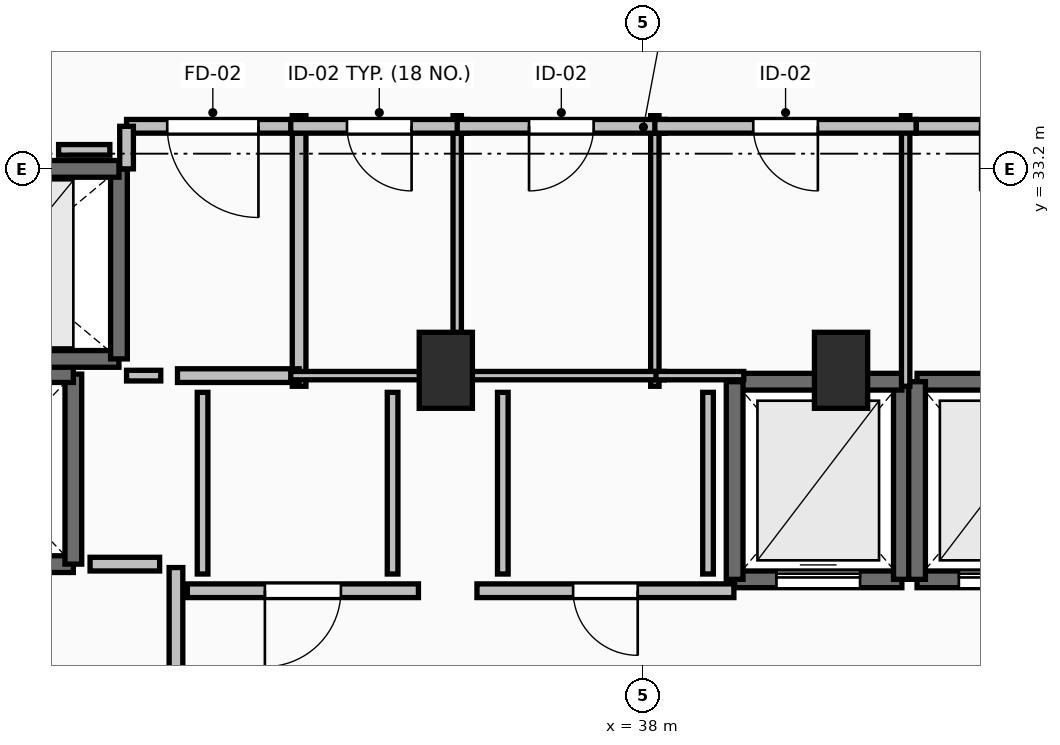
"""IFC4 building model, lengths in metres.
Left out: names, types, materials, properties, quantities, classifications, styles, units other than length and angle.
Written with IfcOpenShell. Run it as: python <this file> out.ifc"""

import sys

from ifc_helpers import new_model, si_unit, direction, frame, frame_2d, origin, origin_2d, place, context, subcontext, project, spatial, rectangle, extrude, element, fill, save


model = new_model("IFC4")
c1 = context("Model", 3, precision=1e-05, world=origin(), true_north=direction((0.0, 1.0)))
c2 = subcontext(c1, "Body", "Model", "MODEL_VIEW")
j1 = project(units=[si_unit("LENGTHUNIT", "METRE"), si_unit("PLANEANGLEUNIT", "RADIAN")], contexts=[c1])
p1 = place(None, origin())
s1 = spatial("IfcSite", under=j1, at=p1, CompositionType="ELEMENT")
p2 = place(p1, origin())
s2 = spatial("IfcBuilding", under=s1, at=p2, CompositionType="ELEMENT")
p3 = place(p2, frame((0.0, 0.0, 273.3)))
s3 = spatial("IfcBuildingStorey", under=s2, at=p3, CompositionType="ELEMENT", Elevation=273.3)
for number, where, z_axis, x_axis in (
    (1, (35.4, 30.55, 0.0), (0.0, 0.0, 1.0), (1.0, 0.0, 0.0)),
    (2, (40.6, 30.55, 0.0), (0.0, 0.0, 1.0), (1.0, 0.0, 0.0)),
):
    element("IfcColumn", number, at=place(p3, frame(where, z_axis=z_axis, x_axis=x_axis)), inside=s3, PredefinedType="PILASTER", context=c2, shape_type="SweptSolid", body=[
        extrude(rectangle(XDim=0.7, YDim=1.0, at=origin_2d()), origin(), (0.0, 0.0, 1.0), 3.55),
    ])
p4 = place(p3, frame((39.2, 27.8, 0.0), z_axis=(0.0, 0.0, 1.0), x_axis=(1.0, 0.0, 0.0)))
e3 = element("IfcWall", 3, at=p4, inside=s3, PredefinedType="SOLIDWALL", context=c2, shape_type="SweptSolid", body=[
    extrude(rectangle(XDim=2.2, YDim=0.22, at=frame_2d((1.1, 0.0))), origin(), (0.0, 0.0, 1.0), 3.29),
])
p5 = place(p4, frame((0.55, 0.0, 0.0)))
e4 = element("IfcOpeningElement", 4, at=p5, cuts=e3, PredefinedType="OPENING", context=c2, shape_type="SweptSolid", body=[
    extrude(rectangle(XDim=1.1, YDim=2.2, at=frame_2d((0.55, 1.1))), frame((0.0, 0.125, 0.0), z_axis=(0.0, -1.0, 0.0), x_axis=(1.0, 0.0, 0.0)), (0.0, 0.0, 1.0), 0.25),
])
p6 = place(p3, frame((41.4, 27.8, 0.0), z_axis=(0.0, 0.0, 1.0), x_axis=(0.0, 1.0, 0.0)))
e5 = element("IfcWall", 5, at=p6, inside=s3, PredefinedType="SOLIDWALL", context=c2, shape_type="SweptSolid", body=[
    extrude(rectangle(XDim=2.6, YDim=0.22, at=frame_2d((1.3, 0.0))), origin(), (0.0, 0.0, 1.0), 3.29),
])
p7 = place(p3, frame((41.4, 30.4, 0.0), z_axis=(0.0, 0.0, 1.0), x_axis=(-1.0, 0.0, 0.0)))
e6 = element("IfcWall", 6, at=p7, inside=s3, PredefinedType="SOLIDWALL", context=c2, shape_type="SweptSolid", body=[
    extrude(rectangle(XDim=2.2, YDim=0.22, at=frame_2d((1.1, 0.0))), origin(), (0.0, 0.0, 1.0), 3.29),
])
p8 = place(p3, frame((39.2, 30.4, 0.0), z_axis=(0.0, 0.0, 1.0), x_axis=(0.0, -1.0, 0.0)))
e7 = element("IfcWall", 7, at=p8, inside=s3, PredefinedType="SOLIDWALL", context=c2, shape_type="SweptSolid", body=[
    extrude(rectangle(XDim=2.6, YDim=0.22, at=frame_2d((1.3, 0.0))), origin(), (0.0, 0.0, 1.0), 3.29),
])
p9 = place(p3, frame((41.6, 27.8, 0.0), z_axis=(0.0, 0.0, 1.0), x_axis=(1.0, 0.0, 0.0)))
e8 = element("IfcWall", 8, at=p9, inside=s3, PredefinedType="SOLIDWALL", context=c2, shape_type="SweptSolid", body=[
    extrude(rectangle(XDim=2.2, YDim=0.22, at=frame_2d((1.1, 0.0))), origin(), (0.0, 0.0, 1.0), 3.29),
])
p10 = place(p9, frame((0.55, 0.0, 0.0)))
e9 = element("IfcOpeningElement", 9, at=p10, cuts=e8, PredefinedType="OPENING", context=c2, shape_type="SweptSolid", body=[
    extrude(rectangle(XDim=1.1, YDim=2.2, at=frame_2d((0.55, 1.1))), frame((0.0, 0.125, 0.0), z_axis=(0.0, -1.0, 0.0), x_axis=(1.0, 0.0, 0.0)), (0.0, 0.0, 1.0), 0.25),
])
p11 = place(p3, frame((43.8, 30.4, 0.0), z_axis=(0.0, 0.0, 1.0), x_axis=(-1.0, 0.0, 0.0)))
e10 = element("IfcWall", 10, at=p11, inside=s3, PredefinedType="SOLIDWALL", context=c2, shape_type="SweptSolid", body=[
    extrude(rectangle(XDim=2.2, YDim=0.22, at=frame_2d((1.1, 0.0))), origin(), (0.0, 0.0, 1.0), 3.29),
])
p12 = place(p3, frame((41.6, 30.4, 0.0), z_axis=(0.0, 0.0, 1.0), x_axis=(0.0, -1.0, 0.0)))
e11 = element("IfcWall", 11, at=p12, inside=s3, PredefinedType="SOLIDWALL", context=c2, shape_type="SweptSolid", body=[
    extrude(rectangle(XDim=2.6, YDim=0.22, at=frame_2d((1.3, 0.0))), origin(), (0.0, 0.0, 1.0), 3.29),
])
p13 = place(p3, frame((28.1, 28.0, 0.0), z_axis=(0.0, 0.0, 1.0), x_axis=(1.0, 0.0, 0.0)))
e12 = element("IfcWall", 12, at=p13, inside=s3, PredefinedType="SHEAR", context=c2, shape_type="SweptSolid", body=[
    extrude(rectangle(XDim=2.4, YDim=0.22, at=frame_2d((1.2, 0.0))), origin(), (0.0, 0.0, 1.0), 3.29),
])
p14 = place(p13, frame((0.6, 0.0, 0.0)))
e13 = element("IfcOpeningElement", 13, at=p14, cuts=e12, PredefinedType="OPENING", context=c2, shape_type="SweptSolid", body=[
    extrude(rectangle(XDim=1.2, YDim=2.2, at=frame_2d((0.6, 1.1))), frame((0.0, 0.125, 0.0), z_axis=(0.0, -1.0, 0.0), x_axis=(1.0, 0.0, 0.0)), (0.0, 0.0, 1.0), 0.25),
])
p15 = place(p3, frame((30.5, 28.0, 0.0), z_axis=(0.0, 0.0, 1.0), x_axis=(0.0, 1.0, 0.0)))
e14 = element("IfcWall", 14, at=p15, inside=s3, PredefinedType="SHEAR", context=c2, shape_type="SweptSolid", body=[
    extrude(rectangle(XDim=2.5, YDim=0.22, at=frame_2d((1.25, 0.0))), origin(), (0.0, 0.0, 1.0), 3.29),
])
p16 = place(p3, frame((30.5, 30.5, 0.0), z_axis=(0.0, 0.0, 1.0), x_axis=(-1.0, 0.0, 0.0)))
e15 = element("IfcWall", 15, at=p16, inside=s3, PredefinedType="SHEAR", context=c2, shape_type="SweptSolid", body=[
    extrude(rectangle(XDim=2.4, YDim=0.22, at=frame_2d((1.2, 0.0))), origin(), (0.0, 0.0, 1.0), 3.29),
])
p17 = place(p3, frame((28.1, 30.7, 0.0), z_axis=(0.0, 0.0, 1.0), x_axis=(1.0, 0.0, 0.0)))
e16 = element("IfcWall", 16, at=p17, inside=s3, PredefinedType="SOLIDWALL", context=c2, shape_type="SweptSolid", body=[
    extrude(rectangle(XDim=3.0, YDim=0.22, at=frame_2d((1.5, 0.0))), origin(), (0.0, 0.0, 1.0), 3.29),
])
p18 = place(p3, frame((31.1, 30.7, 0.0), z_axis=(0.0, 0.0, 1.0), x_axis=(0.0, 1.0, 0.0)))
e17 = element("IfcWall", 17, at=p18, inside=s3, PredefinedType="SOLIDWALL", context=c2, shape_type="SweptSolid", body=[
    extrude(rectangle(XDim=2.5, YDim=0.22, at=frame_2d((1.25, 0.0))), origin(), (0.0, 0.0, 1.0), 3.29),
])
p19 = place(p3, frame((31.1, 33.2, 0.0), z_axis=(0.0, 0.0, 1.0), x_axis=(-1.0, 0.0, 0.0)))
e18 = element("IfcWall", 18, at=p19, inside=s3, PredefinedType="SOLIDWALL", context=c2, shape_type="SweptSolid", body=[
    extrude(rectangle(XDim=3.0, YDim=0.22, at=frame_2d((1.5, 0.0))), origin(), (0.0, 0.0, 1.0), 3.29),
])
p20 = place(p19, frame((0.9, 0.0, 0.0)))
e19 = element("IfcOpeningElement", 19, at=p20, cuts=e18, PredefinedType="OPENING", context=c2, shape_type="SweptSolid", body=[
    extrude(rectangle(XDim=1.2, YDim=2.2, at=frame_2d((0.6, 1.1))), frame((0.0, 0.125, 0.0), z_axis=(0.0, -1.0, 0.0), x_axis=(1.0, 0.0, 0.0)), (0.0, 0.0, 1.0), 0.25),
])
p21 = place(p3, frame((31.85, 24.045, 0.0), z_axis=(0.0, 0.0, 1.0), x_axis=(0.0, 1.0, 0.0)))
e20 = element("IfcWall", 20, at=p21, inside=s3, PredefinedType="PARTITIONING", context=c2, shape_type="SweptSolid", body=[
    extrude(rectangle(XDim=3.91, YDim=0.18, at=frame_2d((1.955, 0.0))), origin(), (0.0, 0.0, 1.0), 3.29),
])
p22 = place(p21, frame((1.355, 0.0, 0.0)))
e21 = element("IfcOpeningElement", 21, at=p22, cuts=e20, PredefinedType="OPENING", context=c2, shape_type="SweptSolid", body=[
    extrude(rectangle(XDim=1.2, YDim=2.15, at=frame_2d((0.6, 1.075))), frame((0.0, 0.105, 0.0), z_axis=(0.0, -1.0, 0.0), x_axis=(1.0, 0.0, 0.0)), (0.0, 0.0, 1.0), 0.21),
])
p23 = place(p3, frame((33.47, 30.34, 0.0), z_axis=(0.0, 0.0, 1.0), x_axis=(0.0, 1.0, 0.0)))
e22 = element("IfcWall", 22, at=p23, inside=s3, PredefinedType="PARTITIONING", context=c2, shape_type="SweptSolid", body=[
    extrude(rectangle(XDim=3.56, YDim=0.18, at=frame_2d((1.78, 0.0))), origin(), (0.0, 0.0, 1.0), 3.29),
])
p24 = place(p3, frame((31.87, 30.48, 0.0), z_axis=(0.0, 0.0, 1.0), x_axis=(1.0, 0.0, 0.0)))
e23 = element("IfcWall", 23, at=p24, inside=s3, PredefinedType="PARTITIONING", context=c2, shape_type="SweptSolid", body=[
    extrude(rectangle(XDim=1.6, YDim=0.18, at=frame_2d((0.8, 0.0))), origin(), (0.0, 0.0, 1.0), 3.29),
])
p25 = place(p3, frame((33.47, 33.76, 0.0), z_axis=(0.0, 0.0, 1.0), x_axis=(-1.0, 0.0, 0.0)))
e24 = element("IfcWall", 24, at=p25, inside=s3, PredefinedType="PARTITIONING", context=c2, shape_type="SweptSolid", body=[
    extrude(rectangle(XDim=2.27, YDim=0.18, at=frame_2d((1.135, 0.0))), origin(), (0.0, 0.0, 1.0), 3.29),
])
p26 = place(p25, frame((0.535, 0.0, 0.0)))
e25 = element("IfcOpeningElement", 25, at=p26, cuts=e24, PredefinedType="OPENING", context=c2, shape_type="SweptSolid", body=[
    extrude(rectangle(XDim=1.2, YDim=2.15, at=frame_2d((0.6, 1.075))), frame((0.0, 0.105, 0.0), z_axis=(0.0, -1.0, 0.0), x_axis=(1.0, 0.0, 0.0)), (0.0, 0.0, 1.0), 0.21),
])
p27 = place(p3, frame((31.2, 33.76, 0.0), z_axis=(0.0, 0.0, 1.0), x_axis=(0.0, -1.0, 0.0)))
e26 = element("IfcWall", 26, at=p27, inside=s3, PredefinedType="PARTITIONING", context=c2, shape_type="SweptSolid", body=[
    extrude(rectangle(XDim=0.56, YDim=0.18, at=frame_2d((0.28, 0.0))), origin(), (0.0, 0.0, 1.0), 3.29),
])
p28 = place(p3, frame((35.04, 27.65, 0.0), z_axis=(0.0, 0.0, 1.0), x_axis=(-1.0, 0.0, 0.0)))
e27 = element("IfcWall", 27, at=p28, inside=s3, PredefinedType="PARTITIONING", context=c2, shape_type="SweptSolid", body=[
    extrude(rectangle(XDim=3.04, YDim=0.18, at=frame_2d((1.52, 0.0))), origin(), (0.0, 0.0, 1.0), 3.29),
])
p29 = place(p28, frame((1.02, 0.0, 0.0)))
e28 = element("IfcOpeningElement", 28, at=p29, cuts=e27, PredefinedType="OPENING", context=c2, shape_type="SweptSolid", body=[
    extrude(rectangle(XDim=1.0, YDim=2.15, at=frame_2d((0.5, 1.075))), frame((0.0, 0.105, 0.0), z_axis=(0.0, -1.0, 0.0), x_axis=(1.0, 0.0, 0.0)), (0.0, 0.0, 1.0), 0.21),
])
p30 = place(p3, frame((39.19, 27.65, 0.0), z_axis=(0.0, 0.0, 1.0), x_axis=(-1.0, 0.0, 0.0)))
e29 = element("IfcWall", 29, at=p30, inside=s3, PredefinedType="PARTITIONING", context=c2, shape_type="SweptSolid", body=[
    extrude(rectangle(XDim=3.38, YDim=0.18, at=frame_2d((1.69, 0.0))), origin(), (0.0, 0.0, 1.0), 3.29),
])
p31 = place(p30, frame((1.265, 0.0, 0.0)))
e30 = element("IfcOpeningElement", 30, at=p31, cuts=e29, PredefinedType="OPENING", context=c2, shape_type="SweptSolid", body=[
    extrude(rectangle(XDim=0.85, YDim=2.1, at=frame_2d((0.425, 1.05))), frame((0.0, 0.105, 0.0), z_axis=(0.0, -1.0, 0.0), x_axis=(1.0, 0.0, 0.0)), (0.0, 0.0, 1.0), 0.21),
])
p32 = place(p3, frame((35.55, 30.34, 0.0), z_axis=(0.0, 0.0, 1.0), x_axis=(0.0, 1.0, 0.0)))
e31 = element("IfcWall", 31, at=p32, inside=s3, PredefinedType="PARTITIONING", context=c2, shape_type="SweptSolid", body=[
    extrude(rectangle(XDim=3.56, YDim=0.11, at=frame_2d((1.78, 0.0))), origin(), (0.0, 0.0, 1.0), 2.482),
])
p33 = place(p3, frame((33.36, 30.48, 0.0), z_axis=(0.0, 0.0, 1.0), x_axis=(1.0, 0.0, 0.0)))
e32 = element("IfcWall", 32, at=p33, inside=s3, PredefinedType="PARTITIONING", context=c2, shape_type="SweptSolid", body=[
    extrude(rectangle(XDim=1.81, YDim=0.11, at=frame_2d((0.905, 0.0))), origin(), (0.0, 0.0, 1.0), 3.29),
])
p34 = place(p3, frame((35.69, 33.76, 0.0), z_axis=(0.0, 0.0, 1.0), x_axis=(-1.0, 0.0, 0.0)))
e33 = element("IfcWall", 33, at=p34, inside=s3, PredefinedType="PARTITIONING", context=c2, shape_type="SweptSolid", body=[
    extrude(rectangle(XDim=2.33, YDim=0.18, at=frame_2d((1.165, 0.0))), origin(), (0.0, 0.0, 1.0), 3.29),
])
p35 = place(p34, frame((0.74, 0.0, 0.0)))
e34 = element("IfcOpeningElement", 34, at=p35, cuts=e33, PredefinedType="OPENING", context=c2, shape_type="SweptSolid", body=[
    extrude(rectangle(XDim=0.85, YDim=2.1, at=frame_2d((0.425, 1.05))), frame((0.0, 0.105, 0.0), z_axis=(0.0, -1.0, 0.0), x_axis=(1.0, 0.0, 0.0)), (0.0, 0.0, 1.0), 0.21),
])
p36 = place(p3, frame((38.15, 30.34, 0.0), z_axis=(0.0, 0.0, 1.0), x_axis=(0.0, 1.0, 0.0)))
e35 = element("IfcWall", 35, at=p36, inside=s3, PredefinedType="PARTITIONING", context=c2, shape_type="SweptSolid", body=[
    extrude(rectangle(XDim=3.56, YDim=0.11, at=frame_2d((1.78, 0.0))), origin(), (0.0, 0.0, 1.0), 2.482),
])
p37 = place(p3, frame((35.68, 30.48, 0.0), z_axis=(0.0, 0.0, 1.0), x_axis=(1.0, 0.0, 0.0)))
e36 = element("IfcWall", 36, at=p37, inside=s3, PredefinedType="PARTITIONING", context=c2, shape_type="SweptSolid", body=[
    extrude(rectangle(XDim=2.595, YDim=0.11, at=frame_2d((1.297, 0.0))), origin(), (0.0, 0.0, 1.0), 2.482),
])
p38 = place(p3, frame((38.29, 33.76, 0.0), z_axis=(0.0, 0.0, 1.0), x_axis=(-1.0, 0.0, 0.0)))
e37 = element("IfcWall", 37, at=p38, inside=s3, PredefinedType="PARTITIONING", context=c2, shape_type="SweptSolid", body=[
    extrude(rectangle(XDim=2.74, YDim=0.18, at=frame_2d((1.37, 0.0))), origin(), (0.0, 0.0, 1.0), 3.29),
])
p39 = place(p38, frame((0.945, 0.0, 0.0)))
e38 = element("IfcOpeningElement", 38, at=p39, cuts=e37, PredefinedType="OPENING", context=c2, shape_type="SweptSolid", body=[
    extrude(rectangle(XDim=0.85, YDim=2.1, at=frame_2d((0.425, 1.05))), frame((0.0, 0.105, 0.0), z_axis=(0.0, -1.0, 0.0), x_axis=(1.0, 0.0, 0.0)), (0.0, 0.0, 1.0), 0.21),
])
p40 = place(p3, frame((41.45, 30.34, 0.0), z_axis=(0.0, 0.0, 1.0), x_axis=(0.0, 1.0, 0.0)))
e39 = element("IfcWall", 39, at=p40, inside=s3, PredefinedType="PARTITIONING", context=c2, shape_type="SweptSolid", body=[
    extrude(rectangle(XDim=3.56, YDim=0.11, at=frame_2d((1.78, 0.0))), origin(), (0.0, 0.0, 1.0), 3.29),
])
p41 = place(p3, frame((38.165, 30.48, 0.0), z_axis=(0.0, 0.0, 1.0), x_axis=(1.0, 0.0, 0.0)))
e40 = element("IfcWall", 40, at=p41, inside=s3, PredefinedType="PARTITIONING", context=c2, shape_type="SweptSolid", body=[
    extrude(rectangle(XDim=1.155, YDim=0.11, at=frame_2d((0.578, 0.0))), origin(), (0.0, 0.0, 1.0), 2.482),
])
p42 = place(p3, frame((41.59, 33.76, 0.0), z_axis=(0.0, 0.0, 1.0), x_axis=(-1.0, 0.0, 0.0)))
e41 = element("IfcWall", 41, at=p42, inside=s3, PredefinedType="PARTITIONING", context=c2, shape_type="SweptSolid", body=[
    extrude(rectangle(XDim=3.44, YDim=0.18, at=frame_2d((1.72, 0.0))), origin(), (0.0, 0.0, 1.0), 3.29),
])
p43 = place(p42, frame((1.295, 0.0, 0.0)))
e42 = element("IfcOpeningElement", 42, at=p43, cuts=e41, PredefinedType="OPENING", context=c2, shape_type="SweptSolid", body=[
    extrude(rectangle(XDim=0.85, YDim=2.1, at=frame_2d((0.425, 1.05))), frame((0.0, 0.105, 0.0), z_axis=(0.0, -1.0, 0.0), x_axis=(1.0, 0.0, 0.0)), (0.0, 0.0, 1.0), 0.21),
])
p44 = place(p3, frame((44.12, 33.76, 0.0), z_axis=(0.0, 0.0, 1.0), x_axis=(-1.0, 0.0, 0.0)))
e43 = element("IfcWall", 43, at=p44, inside=s3, PredefinedType="PARTITIONING", context=c2, shape_type="SweptSolid", body=[
    extrude(rectangle(XDim=2.53, YDim=0.18, at=frame_2d((1.265, 0.0))), origin(), (0.0, 0.0, 1.0), 3.29),
])
p45 = place(p44, frame((0.84, 0.0, 0.0)))
e44 = element("IfcOpeningElement", 44, at=p45, cuts=e43, PredefinedType="OPENING", context=c2, shape_type="SweptSolid", body=[
    extrude(rectangle(XDim=0.85, YDim=2.1, at=frame_2d((0.425, 1.05))), frame((0.0, 0.105, 0.0), z_axis=(0.0, -1.0, 0.0), x_axis=(1.0, 0.0, 0.0)), (0.0, 0.0, 1.0), 0.21),
])
p46 = place(p3, frame((31.635, 28.0, 0.0), z_axis=(0.0, 0.0, 1.0), x_axis=(-1.0, 0.0, 0.0)))
e45 = element("IfcWall", 45, at=p46, inside=s3, PredefinedType="PARTITIONING", context=c2, shape_type="SweptSolid", body=[
    extrude(rectangle(XDim=0.915, YDim=0.18, at=frame_2d((0.458, 0.0))), origin(), (0.0, 0.0, 1.0), 3.29),
])
p47 = place(p3, frame((31.2, 30.48, 0.0), z_axis=(0.0, 0.0, 1.0), x_axis=(1.0, 0.0, 0.0)))
e46 = element("IfcWall", 46, at=p47, inside=s3, PredefinedType="PARTITIONING", context=c2, shape_type="SweptSolid", body=[
    extrude(rectangle(XDim=0.45, YDim=0.14, at=frame_2d((0.225, 0.0))), origin(), (0.0, 0.0, 1.0), 3.29),
])
for number, where, z_axis, x_axis in (
    (47, (32.2, 30.26, 0.0), (0.0, 0.0, 1.0), (0.0, -1.0, 0.0)),
    (48, (34.7, 27.87, 0.0), (0.0, 0.0, 1.0), (0.0, 1.0, 0.0)),
    (49, (36.15, 30.26, 0.0), (0.0, 0.0, 1.0), (0.0, -1.0, 0.0)),
    (50, (38.85, 27.87, 0.0), (0.0, 0.0, 1.0), (0.0, 1.0, 0.0)),
):
    element("IfcWall", number, at=place(p3, frame(where, z_axis=z_axis, x_axis=x_axis)), inside=s3, PredefinedType="PARTITIONING", context=c2, shape_type="SweptSolid", body=[
        extrude(rectangle(XDim=2.39, YDim=0.14, at=frame_2d((1.195, 0.0))), origin(), (0.0, 0.0, 1.0), 3.29),
    ])
p48 = place(p3, frame((30.98, 33.45, 0.0), z_axis=(0.0, 0.0, 1.0), x_axis=(-1.0, 0.0, 0.0)))
e51 = element("IfcWall", 51, at=p48, inside=s3, PredefinedType="PARTITIONING", context=c2, shape_type="SweptSolid", body=[
    extrude(rectangle(XDim=0.674, YDim=0.14, at=frame_2d((0.337, 0.0))), origin(), (0.0, 0.0, 1.0), 3.29),
])
p49 = place(p5, origin())
e52 = element("IfcDoor", 52, at=p49, inside=s3, OperationType="SLIDING_TO_LEFT", PredefinedType="DOOR", context=c2, shape_type="SweptSolid", body=[
    extrude(rectangle(XDim=1.1, YDim=2.2, at=frame_2d((0.55, 1.1))), frame((0.0, 0.025, 0.0), z_axis=(0.0, -1.0, 0.0), x_axis=(1.0, 0.0, 0.0)), (0.0, 0.0, 1.0), 0.05),
])
fill(e4, e52)
p50 = place(p10, origin())
e53 = element("IfcDoor", 53, at=p50, inside=s3, OperationType="SLIDING_TO_LEFT", PredefinedType="DOOR", context=c2, shape_type="SweptSolid", body=[
    extrude(rectangle(XDim=1.1, YDim=2.2, at=frame_2d((0.55, 1.1))), frame((0.0, 0.025, 0.0), z_axis=(0.0, -1.0, 0.0), x_axis=(1.0, 0.0, 0.0)), (0.0, 0.0, 1.0), 0.05),
])
fill(e9, e53)
p51 = place(p26, origin())
e54 = element("IfcDoor", 54, at=p51, inside=s3, OperationType="SINGLE_SWING_LEFT", PredefinedType="DOOR", context=c2, shape_type="SweptSolid", body=[
    extrude(rectangle(XDim=1.2, YDim=2.15, at=frame_2d((0.6, 1.075))), frame((0.0, 0.025, 0.0), z_axis=(0.0, -1.0, 0.0), x_axis=(1.0, 0.0, 0.0)), (0.0, 0.0, 1.0), 0.05),
])
fill(e25, e54)
p52 = place(p29, origin())
e55 = element("IfcDoor", 55, at=p52, inside=s3, OperationType="SINGLE_SWING_RIGHT", PredefinedType="DOOR", context=c2, shape_type="SweptSolid", body=[
    extrude(rectangle(XDim=1.0, YDim=2.15, at=frame_2d((0.5, 1.075))), frame((0.0, 0.025, 0.0), z_axis=(0.0, -1.0, 0.0), x_axis=(1.0, 0.0, 0.0)), (0.0, 0.0, 1.0), 0.05),
])
fill(e28, e55)
p53 = place(p31, origin())
e56 = element("IfcDoor", 56, at=p53, inside=s3, OperationType="SINGLE_SWING_LEFT", PredefinedType="DOOR", context=c2, shape_type="SweptSolid", body=[
    extrude(rectangle(XDim=0.85, YDim=2.1, at=frame_2d((0.425, 1.05))), frame((0.0, 0.025, 0.0), z_axis=(0.0, -1.0, 0.0), x_axis=(1.0, 0.0, 0.0)), (0.0, 0.0, 1.0), 0.05),
])
fill(e30, e56)
p54 = place(p35, origin())
e57 = element("IfcDoor", 57, at=p54, inside=s3, OperationType="SINGLE_SWING_LEFT", PredefinedType="DOOR", context=c2, shape_type="SweptSolid", body=[
    extrude(rectangle(XDim=0.85, YDim=2.1, at=frame_2d((0.425, 1.05))), frame((0.0, 0.025, 0.0), z_axis=(0.0, -1.0, 0.0), x_axis=(1.0, 0.0, 0.0)), (0.0, 0.0, 1.0), 0.05),
])
fill(e34, e57)
p55 = place(p39, origin())
e58 = element("IfcDoor", 58, at=p55, inside=s3, OperationType="SINGLE_SWING_RIGHT", PredefinedType="DOOR", context=c2, shape_type="SweptSolid", body=[
    extrude(rectangle(XDim=0.85, YDim=2.1, at=frame_2d((0.425, 1.05))), frame((0.0, 0.025, 0.0), z_axis=(0.0, -1.0, 0.0), x_axis=(1.0, 0.0, 0.0)), (0.0, 0.0, 1.0), 0.05),
])
fill(e38, e58)
p56 = place(p43, origin())
e59 = element("IfcDoor", 59, at=p56, inside=s3, OperationType="SINGLE_SWING_LEFT", PredefinedType="DOOR", context=c2, shape_type="SweptSolid", body=[
    extrude(rectangle(XDim=0.85, YDim=2.1, at=frame_2d((0.425, 1.05))), frame((0.0, 0.025, 0.0), z_axis=(0.0, -1.0, 0.0), x_axis=(1.0, 0.0, 0.0)), (0.0, 0.0, 1.0), 0.05),
])
fill(e42, e59)
save(model, sys.argv[1])
